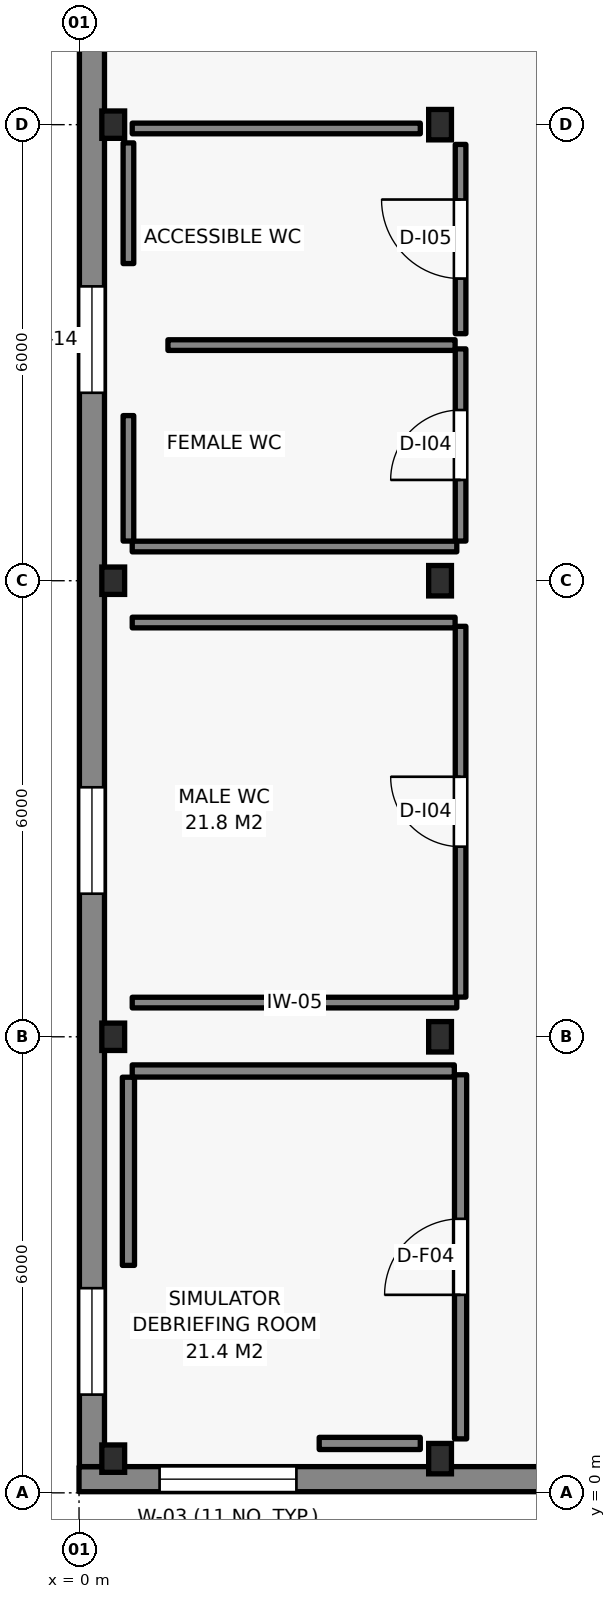
"""IFC4 building model, lengths in metres.
Left out: names, types, materials, properties, quantities, classifications, styles, units other than length and angle.
Written with IfcOpenShell. Run it as: python <this file> out.ifc"""

import sys

from ifc_helpers import new_model, si_unit, direction, frame, frame_2d, origin, origin_2d, place, context, subcontext, project, spatial, rectangle, i_section, extrude, element, fill, save


model = new_model("IFC4")
c1 = context("Model", 3, precision=1e-05, world=origin(), true_north=direction((0.0, 1.0)))
c2 = subcontext(c1, "Body", "Model", "MODEL_VIEW")
j1 = project(units=[si_unit("LENGTHUNIT", "METRE"), si_unit("PLANEANGLEUNIT", "RADIAN")], contexts=[c1])
p1 = place(None, origin())
s1 = spatial("IfcSite", under=j1, at=p1, CompositionType="ELEMENT")
p2 = place(p1, origin())
s2 = spatial("IfcBuilding", under=s1, at=p2, CompositionType="ELEMENT")
p3 = place(p2, frame((0.0, 0.0, 14.7)))
s3 = spatial("IfcBuildingStorey", under=s2, at=p3, CompositionType="ELEMENT", Elevation=14.7)
for number, where, z_axis, x_axis in (
    (1, (0.45, 0.45, 0.0), (0.0, 0.0, 1.0), (1.0, 0.0, 0.0)),
    (2, (0.45, 6.0, 0.0), (0.0, 0.0, 1.0), (1.0, 0.0, 0.0)),
    (3, (0.45, 12.0, 0.0), (0.0, 0.0, 1.0), (1.0, 0.0, 0.0)),
    (4, (0.45, 18.0, 0.0), (0.0, 0.0, 1.0), (1.0, 0.0, 0.0)),
):
    element("IfcColumn", number, at=place(p3, frame(where, z_axis=z_axis, x_axis=x_axis)), inside=s3, PredefinedType="COLUMN", context=c2, shape_type="SweptSolid", body=[
        extrude(i_section(OverallWidth=0.3, OverallDepth=0.36, WebThickness=0.012, FlangeThickness=0.022, FilletRadius=0.027, at=origin_2d()), origin(), (0.0, 0.0, 1.0), 4.05),
    ])
for number, where, z_axis, x_axis in (
    (5, (4.75, 0.45, 0.0), (0.0, 0.0, 1.0), (1.0, 0.0, 0.0)),
    (6, (4.75, 6.0, 0.0), (0.0, 0.0, 1.0), (1.0, 0.0, 0.0)),
    (7, (4.75, 12.0, 0.0), (0.0, 0.0, 1.0), (1.0, 0.0, 0.0)),
    (8, (4.75, 18.0, 0.0), (0.0, 0.0, 1.0), (1.0, 0.0, 0.0)),
):
    element("IfcColumn", number, at=place(p3, frame(where, z_axis=z_axis, x_axis=x_axis)), inside=s3, PredefinedType="COLUMN", context=c2, shape_type="SweptSolid", body=[
        extrude(i_section(OverallWidth=0.3, OverallDepth=0.4, WebThickness=0.013, FlangeThickness=0.024, FilletRadius=0.027, at=origin_2d()), origin(), (0.0, 0.0, 1.0), 4.05),
    ])
p4 = place(p3, frame((0.0, 0.18, 0.0), z_axis=(0.0, 0.0, 1.0), x_axis=(1.0, 0.0, 0.0)))
e9 = element("IfcWall", 9, at=p4, inside=s3, PredefinedType="SOLIDWALL", context=c2, shape_type="SweptSolid", body=[
    extrude(rectangle(XDim=19.6, YDim=0.33, at=frame_2d((9.8, 0.0))), origin(), (0.0, 0.0, 1.0), 3.575),
])
p5 = place(p4, frame((1.06, 0.0, 0.82)))
e10 = element("IfcOpeningElement", 10, at=p5, cuts=e9, PredefinedType="OPENING", context=c2, shape_type="SweptSolid", body=[
    extrude(rectangle(XDim=1.8, YDim=2.35, at=frame_2d((0.9, 1.175))), frame((0.0, 0.175, 0.0), z_axis=(0.0, -1.0, 0.0), x_axis=(1.0, 0.0, 0.0)), (0.0, 0.0, 1.0), 0.35),
])
p6 = place(p4, frame((8.9, 0.0, 0.82)))
e11 = element("IfcOpeningElement", 11, at=p6, cuts=e9, PredefinedType="OPENING", context=c2, shape_type="SweptSolid", body=[
    extrude(rectangle(XDim=1.8, YDim=2.35, at=frame_2d((0.9, 1.175))), frame((0.0, 0.175, 0.0), z_axis=(0.0, -1.0, 0.0), x_axis=(1.0, 0.0, 0.0)), (0.0, 0.0, 1.0), 0.35),
])
p7 = place(p4, frame((12.82, 0.0, 0.82)))
e12 = element("IfcOpeningElement", 12, at=p7, cuts=e9, PredefinedType="OPENING", context=c2, shape_type="SweptSolid", body=[
    extrude(rectangle(XDim=1.8, YDim=2.35, at=frame_2d((0.9, 1.175))), frame((0.0, 0.175, 0.0), z_axis=(0.0, -1.0, 0.0), x_axis=(1.0, 0.0, 0.0)), (0.0, 0.0, 1.0), 0.35),
])
p8 = place(p4, frame((16.74, 0.0, 0.82)))
e13 = element("IfcOpeningElement", 13, at=p8, cuts=e9, PredefinedType="OPENING", context=c2, shape_type="SweptSolid", body=[
    extrude(rectangle(XDim=1.8, YDim=2.35, at=frame_2d((0.9, 1.175))), frame((0.0, 0.175, 0.0), z_axis=(0.0, -1.0, 0.0), x_axis=(1.0, 0.0, 0.0)), (0.0, 0.0, 1.0), 0.35),
])
p9 = place(p3, frame((0.17, 30.0, 0.0), z_axis=(0.0, 0.0, 1.0), x_axis=(0.0, -1.0, 0.0)))
e14 = element("IfcWall", 14, at=p9, inside=s3, PredefinedType="SOLIDWALL", context=c2, shape_type="SweptSolid", body=[
    extrude(rectangle(XDim=29.655, YDim=0.33, at=frame_2d((14.828, 0.0))), origin(), (0.0, 0.0, 1.0), 3.435),
])
p10 = place(p9, frame((0.948, 0.0, 0.82)))
e15 = element("IfcOpeningElement", 15, at=p10, cuts=e14, PredefinedType="OPENING", context=c2, shape_type="SweptSolid", body=[
    extrude(rectangle(XDim=1.4, YDim=2.1, at=frame_2d((0.7, 1.05))), frame((0.0, 0.175, 0.0), z_axis=(0.0, -1.0, 0.0), x_axis=(1.0, 0.0, 0.0)), (0.0, 0.0, 1.0), 0.35),
])
p11 = place(p9, frame((4.242, 0.0, 0.82)))
e16 = element("IfcOpeningElement", 16, at=p11, cuts=e14, PredefinedType="OPENING", context=c2, shape_type="SweptSolid", body=[
    extrude(rectangle(XDim=1.4, YDim=2.1, at=frame_2d((0.7, 1.05))), frame((0.0, 0.175, 0.0), z_axis=(0.0, -1.0, 0.0), x_axis=(1.0, 0.0, 0.0)), (0.0, 0.0, 1.0), 0.35),
])
p12 = place(p9, frame((7.538, 0.0, 0.82)))
e17 = element("IfcOpeningElement", 17, at=p12, cuts=e14, PredefinedType="OPENING", context=c2, shape_type="SweptSolid", body=[
    extrude(rectangle(XDim=1.4, YDim=2.1, at=frame_2d((0.7, 1.05))), frame((0.0, 0.175, 0.0), z_axis=(0.0, -1.0, 0.0), x_axis=(1.0, 0.0, 0.0)), (0.0, 0.0, 1.0), 0.35),
])
p13 = place(p9, frame((14.127, 0.0, 0.82)))
e18 = element("IfcOpeningElement", 18, at=p13, cuts=e14, PredefinedType="OPENING", context=c2, shape_type="SweptSolid", body=[
    extrude(rectangle(XDim=1.4, YDim=2.1, at=frame_2d((0.7, 1.05))), frame((0.0, 0.175, 0.0), z_axis=(0.0, -1.0, 0.0), x_axis=(1.0, 0.0, 0.0)), (0.0, 0.0, 1.0), 0.35),
])
p14 = place(p9, frame((20.718, 0.0, 0.82)))
e19 = element("IfcOpeningElement", 19, at=p14, cuts=e14, PredefinedType="OPENING", context=c2, shape_type="SweptSolid", body=[
    extrude(rectangle(XDim=1.4, YDim=2.1, at=frame_2d((0.7, 1.05))), frame((0.0, 0.175, 0.0), z_axis=(0.0, -1.0, 0.0), x_axis=(1.0, 0.0, 0.0)), (0.0, 0.0, 1.0), 0.35),
])
p15 = place(p9, frame((27.308, 0.0, 0.82)))
e20 = element("IfcOpeningElement", 20, at=p15, cuts=e14, PredefinedType="OPENING", context=c2, shape_type="SweptSolid", body=[
    extrude(rectangle(XDim=1.4, YDim=2.1, at=frame_2d((0.7, 1.05))), frame((0.0, 0.175, 0.0), z_axis=(0.0, -1.0, 0.0), x_axis=(1.0, 0.0, 0.0)), (0.0, 0.0, 1.0), 0.35),
])
p16 = place(p3, frame((3.16, 0.65, 0.0), z_axis=(0.0, 0.0, 1.0), x_axis=(1.0, 0.0, 0.0)))
e21 = element("IfcWall", 21, at=p16, inside=s3, PredefinedType="PARTITIONING", context=c2, shape_type="SweptSolid", body=[
    extrude(rectangle(XDim=1.33, YDim=0.16, at=frame_2d((0.665, 0.0))), origin(), (0.0, 0.0, 1.0), 3.435),
])
p17 = place(p3, frame((5.02, 0.71, 0.0), z_axis=(0.0, 0.0, 1.0), x_axis=(0.0, 1.0, 0.0)))
e22 = element("IfcWall", 22, at=p17, inside=s3, PredefinedType="PARTITIONING", context=c2, shape_type="SweptSolid", body=[
    extrude(rectangle(XDim=4.79, YDim=0.16, at=frame_2d((2.395, 0.0))), origin(), (0.0, 0.0, 1.0), 3.435),
])
p18 = place(p17, frame((1.895, 0.0, 0.0)))
e23 = element("IfcOpeningElement", 23, at=p18, cuts=e22, PredefinedType="OPENING", context=c2, shape_type="SweptSolid", body=[
    extrude(rectangle(XDim=1.0, YDim=2.15, at=frame_2d((0.5, 1.075))), frame((0.0, 0.09, 0.0), z_axis=(0.0, -1.0, 0.0), x_axis=(1.0, 0.0, 0.0)), (0.0, 0.0, 1.0), 0.18),
])
p19 = place(p3, frame((4.938, 5.55, 0.0), z_axis=(0.0, 0.0, 1.0), x_axis=(-1.0, 0.0, 0.0)))
e24 = element("IfcWall", 24, at=p19, inside=s3, PredefinedType="PARTITIONING", context=c2, shape_type="SweptSolid", body=[
    extrude(rectangle(XDim=4.238, YDim=0.16, at=frame_2d((2.119, 0.0))), origin(), (0.0, 0.0, 1.0), 3.435),
])
p20 = place(p3, frame((0.65, 5.468, 0.0), z_axis=(0.0, 0.0, 1.0), x_axis=(0.0, -1.0, 0.0)))
e25 = element("IfcWall", 25, at=p20, inside=s3, PredefinedType="PARTITIONING", context=c2, shape_type="SweptSolid", body=[
    extrude(rectangle(XDim=2.476, YDim=0.16, at=frame_2d((1.238, 0.0))), origin(), (0.0, 0.0, 1.0), 3.435),
])
p21 = place(p3, frame((0.7, 6.45, 0.0), z_axis=(0.0, 0.0, 1.0), x_axis=(1.0, 0.0, 0.0)))
e26 = element("IfcWall", 26, at=p21, inside=s3, PredefinedType="PARTITIONING", context=c2, shape_type="SweptSolid", body=[
    extrude(rectangle(XDim=4.27, YDim=0.14, at=frame_2d((2.135, 0.0))), origin(), (0.0, 0.0, 1.0), 3.435),
])
p22 = place(p3, frame((5.02, 6.522, 0.0), z_axis=(0.0, 0.0, 1.0), x_axis=(0.0, 1.0, 0.0)))
e27 = element("IfcWall", 27, at=p22, inside=s3, PredefinedType="PARTITIONING", context=c2, shape_type="SweptSolid", body=[
    extrude(rectangle(XDim=4.878, YDim=0.14, at=frame_2d((2.439, 0.0))), origin(), (0.0, 0.0, 1.0), 3.435),
])
p23 = place(p22, frame((1.979, 0.0, 0.0)))
e28 = element("IfcOpeningElement", 28, at=p23, cuts=e27, PredefinedType="OPENING", context=c2, shape_type="SweptSolid", body=[
    extrude(rectangle(XDim=0.92, YDim=2.08, at=frame_2d((0.46, 1.04))), frame((0.0, 0.08, 0.0), z_axis=(0.0, -1.0, 0.0), x_axis=(1.0, 0.0, 0.0)), (0.0, 0.0, 1.0), 0.16),
])
p24 = place(p3, frame((4.948, 11.45, 0.0), z_axis=(0.0, 0.0, 1.0), x_axis=(-1.0, 0.0, 0.0)))
e29 = element("IfcWall", 29, at=p24, inside=s3, PredefinedType="PARTITIONING", context=c2, shape_type="SweptSolid", body=[
    extrude(rectangle(XDim=4.248, YDim=0.14, at=frame_2d((2.124, 0.0))), origin(), (0.0, 0.0, 1.0), 3.435),
])
p25 = place(p3, frame((0.7, 12.45, 0.0), z_axis=(0.0, 0.0, 1.0), x_axis=(1.0, 0.0, 0.0)))
e30 = element("IfcWall", 30, at=p25, inside=s3, PredefinedType="PARTITIONING", context=c2, shape_type="SweptSolid", body=[
    extrude(rectangle(XDim=4.27, YDim=0.14, at=frame_2d((2.135, 0.0))), origin(), (0.0, 0.0, 1.0), 3.435),
])
p26 = place(p3, frame((5.02, 12.522, 0.0), z_axis=(0.0, 0.0, 1.0), x_axis=(0.0, 1.0, 0.0)))
e31 = element("IfcWall", 31, at=p26, inside=s3, PredefinedType="PARTITIONING", context=c2, shape_type="SweptSolid", body=[
    extrude(rectangle(XDim=2.528, YDim=0.14, at=frame_2d((1.264, 0.0))), origin(), (0.0, 0.0, 1.0), 3.435),
])
p27 = place(p26, frame((0.804, 0.0, 0.0)))
e32 = element("IfcOpeningElement", 32, at=p27, cuts=e31, PredefinedType="OPENING", context=c2, shape_type="SweptSolid", body=[
    extrude(rectangle(XDim=0.92, YDim=2.08, at=frame_2d((0.46, 1.04))), frame((0.0, 0.08, 0.0), z_axis=(0.0, -1.0, 0.0), x_axis=(1.0, 0.0, 0.0)), (0.0, 0.0, 1.0), 0.16),
])
p28 = place(p3, frame((4.948, 15.1, 0.0), z_axis=(0.0, 0.0, 1.0), x_axis=(-1.0, 0.0, 0.0)))
e33 = element("IfcWall", 33, at=p28, inside=s3, PredefinedType="PARTITIONING", context=c2, shape_type="SweptSolid", body=[
    extrude(rectangle(XDim=3.778, YDim=0.14, at=frame_2d((1.889, 0.0))), origin(), (0.0, 0.0, 1.0), 3.435),
])
p29 = place(p3, frame((0.65, 14.173, 0.0), z_axis=(0.0, 0.0, 1.0), x_axis=(0.0, -1.0, 0.0)))
e34 = element("IfcWall", 34, at=p29, inside=s3, PredefinedType="PARTITIONING", context=c2, shape_type="SweptSolid", body=[
    extrude(rectangle(XDim=1.651, YDim=0.14, at=frame_2d((0.825, 0.0))), origin(), (0.0, 0.0, 1.0), 3.435),
])
p30 = place(p3, frame((5.02, 15.25, 0.0), z_axis=(0.0, 0.0, 1.0), x_axis=(0.0, 1.0, 0.0)))
e35 = element("IfcWall", 35, at=p30, inside=s3, PredefinedType="PARTITIONING", context=c2, shape_type="SweptSolid", body=[
    extrude(rectangle(XDim=2.49, YDim=0.14, at=frame_2d((1.245, 0.0))), origin(), (0.0, 0.0, 1.0), 3.435),
])
p31 = place(p30, frame((0.725, 0.0, 0.0)))
e36 = element("IfcOpeningElement", 36, at=p31, cuts=e35, PredefinedType="OPENING", context=c2, shape_type="SweptSolid", body=[
    extrude(rectangle(XDim=1.04, YDim=2.1, at=frame_2d((0.52, 1.05))), frame((0.0, 0.08, 0.0), z_axis=(0.0, -1.0, 0.0), x_axis=(1.0, 0.0, 0.0)), (0.0, 0.0, 1.0), 0.16),
])
p32 = place(p3, frame((4.49, 17.95, 0.0), z_axis=(0.0, 0.0, 1.0), x_axis=(-1.0, 0.0, 0.0)))
e37 = element("IfcWall", 37, at=p32, inside=s3, PredefinedType="PARTITIONING", context=c2, shape_type="SweptSolid", body=[
    extrude(rectangle(XDim=3.79, YDim=0.14, at=frame_2d((1.895, 0.0))), origin(), (0.0, 0.0, 1.0), 3.435),
])
p33 = place(p3, frame((0.65, 17.76, 0.0), z_axis=(0.0, 0.0, 1.0), x_axis=(0.0, -1.0, 0.0)))
e38 = element("IfcWall", 38, at=p33, inside=s3, PredefinedType="PARTITIONING", context=c2, shape_type="SweptSolid", body=[
    extrude(rectangle(XDim=1.587, YDim=0.14, at=frame_2d((0.794, 0.0))), origin(), (0.0, 0.0, 1.0), 3.435),
])
p34 = place(p5, origin())
e39 = element("IfcWindow", 39, at=p34, inside=s3, PartitioningType="SINGLE_PANEL", PredefinedType="WINDOW", context=c2, shape_type="SweptSolid", body=[
    extrude(rectangle(XDim=1.8, YDim=2.35, at=frame_2d((0.9, 1.175))), frame((0.0, 0.03, 0.0), z_axis=(0.0, -1.0, 0.0), x_axis=(1.0, 0.0, 0.0)), (0.0, 0.0, 1.0), 0.06),
])
fill(e10, e39)
p35 = place(p13, origin())
e40 = element("IfcWindow", 40, at=p35, inside=s3, PartitioningType="SINGLE_PANEL", PredefinedType="WINDOW", context=c2, shape_type="SweptSolid", body=[
    extrude(rectangle(XDim=1.4, YDim=2.1, at=frame_2d((0.7, 1.05))), frame((0.0, 0.03, 0.0), z_axis=(0.0, -1.0, 0.0), x_axis=(1.0, 0.0, 0.0)), (0.0, 0.0, 1.0), 0.06),
])
fill(e18, e40)
p36 = place(p14, origin())
e41 = element("IfcWindow", 41, at=p36, inside=s3, PartitioningType="SINGLE_PANEL", PredefinedType="WINDOW", context=c2, shape_type="SweptSolid", body=[
    extrude(rectangle(XDim=1.4, YDim=2.1, at=frame_2d((0.7, 1.05))), frame((0.0, 0.03, 0.0), z_axis=(0.0, -1.0, 0.0), x_axis=(1.0, 0.0, 0.0)), (0.0, 0.0, 1.0), 0.06),
])
fill(e19, e41)
p37 = place(p15, origin())
e42 = element("IfcWindow", 42, at=p37, inside=s3, PartitioningType="SINGLE_PANEL", PredefinedType="WINDOW", context=c2, shape_type="SweptSolid", body=[
    extrude(rectangle(XDim=1.4, YDim=2.1, at=frame_2d((0.7, 1.05))), frame((0.0, 0.03, 0.0), z_axis=(0.0, -1.0, 0.0), x_axis=(1.0, 0.0, 0.0)), (0.0, 0.0, 1.0), 0.06),
])
fill(e20, e42)
p38 = place(p18, origin())
e43 = element("IfcDoor", 43, at=p38, inside=s3, OperationType="SINGLE_SWING_LEFT", PredefinedType="DOOR", context=c2, shape_type="SweptSolid", body=[
    extrude(rectangle(XDim=1.0, YDim=2.15, at=frame_2d((0.5, 1.075))), frame((0.0, 0.025, 0.0), z_axis=(0.0, -1.0, 0.0), x_axis=(1.0, 0.0, 0.0)), (0.0, 0.0, 1.0), 0.05),
])
fill(e23, e43)
p39 = place(p23, origin())
e44 = element("IfcDoor", 44, at=p39, inside=s3, OperationType="SINGLE_SWING_RIGHT", PredefinedType="DOOR", context=c2, shape_type="SweptSolid", body=[
    extrude(rectangle(XDim=0.92, YDim=2.08, at=frame_2d((0.46, 1.04))), frame((0.0, 0.025, 0.0), z_axis=(0.0, -1.0, 0.0), x_axis=(1.0, 0.0, 0.0)), (0.0, 0.0, 1.0), 0.05),
])
fill(e28, e44)
p40 = place(p27, origin())
e45 = element("IfcDoor", 45, at=p40, inside=s3, OperationType="SINGLE_SWING_LEFT", PredefinedType="DOOR", context=c2, shape_type="SweptSolid", body=[
    extrude(rectangle(XDim=0.92, YDim=2.08, at=frame_2d((0.46, 1.04))), frame((0.0, 0.025, 0.0), z_axis=(0.0, -1.0, 0.0), x_axis=(1.0, 0.0, 0.0)), (0.0, 0.0, 1.0), 0.05),
])
fill(e32, e45)
p41 = place(p31, origin())
e46 = element("IfcDoor", 46, at=p41, inside=s3, OperationType="SINGLE_SWING_RIGHT", PredefinedType="DOOR", context=c2, shape_type="SweptSolid", body=[
    extrude(rectangle(XDim=1.04, YDim=2.1, at=frame_2d((0.52, 1.05))), frame((0.0, 0.025, 0.0), z_axis=(0.0, -1.0, 0.0), x_axis=(1.0, 0.0, 0.0)), (0.0, 0.0, 1.0), 0.05),
])
fill(e36, e46)
save(model, sys.argv[1])
